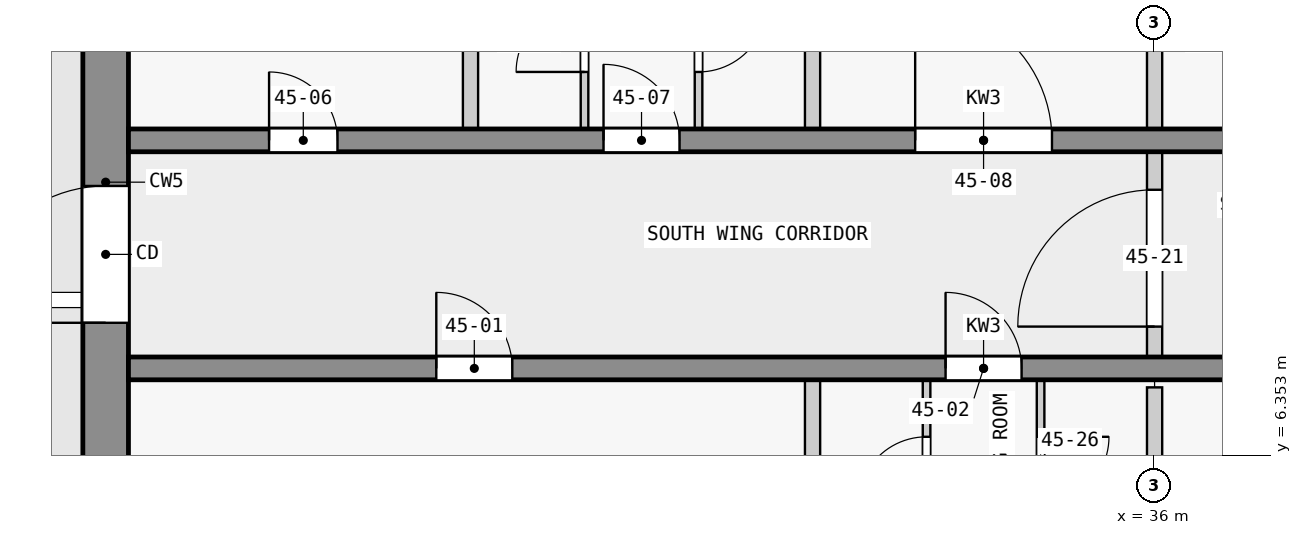
"""IFC4 building model, lengths in metres.
Left out: names, types, materials, properties, quantities, classifications, styles, units other than length and angle.
Written with IfcOpenShell. Run it as: python <this file> out.ifc"""

import sys

from ifc_helpers import new_model, si_unit, direction, frame, frame_2d, origin, place, context, subcontext, project, spatial, rectangle, extrude, element, fill, save


model = new_model("IFC4")
c1 = context("Model", 3, precision=1e-05, world=origin(), true_north=direction((0.0, 1.0)))
c2 = subcontext(c1, "Body", "Model", "MODEL_VIEW")
j1 = project(units=[si_unit("LENGTHUNIT", "METRE"), si_unit("PLANEANGLEUNIT", "RADIAN")], contexts=[c1])
p1 = place(None, origin())
s1 = spatial("IfcSite", under=j1, at=p1, CompositionType="ELEMENT")
p2 = place(p1, origin())
s2 = spatial("IfcBuilding", under=s1, at=p2, CompositionType="ELEMENT")
p3 = place(p2, frame((0.0, 0.0, 174.4)))
s3 = spatial("IfcBuildingStorey", under=s2, at=p3, CompositionType="ELEMENT", Elevation=174.4)
p4 = place(p3, frame((22.2, 2.5, 0.0), z_axis=(0.0, 0.0, 1.0), x_axis=(0.0, 1.0, 0.0)))
e1 = element("IfcWall", 1, at=p4, inside=s3, PredefinedType="SHEAR", context=c2, shape_type="SweptSolid", body=[
    extrude(rectangle(XDim=14.9, YDim=0.6, at=frame_2d((7.45, 0.0))), origin(), (0.0, 0.0, 1.0), 3.25),
])
p5 = place(p4, frame((5.6, 0.0, 0.0)))
e2 = element("IfcOpeningElement", 2, at=p5, cuts=e1, PredefinedType="OPENING", context=c2, shape_type="SweptSolid", body=[
    extrude(rectangle(XDim=1.8, YDim=2.1, at=frame_2d((0.9, 1.05))), frame((0.0, 0.31, 0.0), z_axis=(0.0, -1.0, 0.0), x_axis=(1.0, 0.0, 0.0)), (0.0, 0.0, 1.0), 0.62),
])
p6 = place(p3, frame((22.5, 7.5, 0.0), z_axis=(0.0, 0.0, 1.0), x_axis=(1.0, 0.0, 0.0)))
e3 = element("IfcWall", 3, at=p6, inside=s3, PredefinedType="SHEAR", context=c2, shape_type="SweptSolid", body=[
    extrude(rectangle(XDim=22.5, YDim=0.3, at=frame_2d((11.25, 0.0))), origin(), (0.0, 0.0, 1.0), 3.25),
])
p7 = place(p6, frame((4.05, 0.0, 0.0)))
e4 = element("IfcOpeningElement", 4, at=p7, cuts=e3, PredefinedType="OPENING", context=c2, shape_type="SweptSolid", body=[
    extrude(rectangle(XDim=1.0, YDim=2.1, at=frame_2d((0.5, 1.05))), frame((0.0, 0.16, 0.0), z_axis=(0.0, -1.0, 0.0), x_axis=(1.0, 0.0, 0.0)), (0.0, 0.0, 1.0), 0.32),
])
p8 = place(p6, frame((10.75, 0.0, 0.0)))
e5 = element("IfcOpeningElement", 5, at=p8, cuts=e3, PredefinedType="OPENING", context=c2, shape_type="SweptSolid", body=[
    extrude(rectangle(XDim=1.0, YDim=2.1, at=frame_2d((0.5, 1.05))), frame((0.0, 0.16, 0.0), z_axis=(0.0, -1.0, 0.0), x_axis=(1.0, 0.0, 0.0)), (0.0, 0.0, 1.0), 0.32),
])
p9 = place(p6, frame((15.35, 0.0, 0.0)))
e6 = element("IfcOpeningElement", 6, at=p9, cuts=e3, PredefinedType="OPENING", context=c2, shape_type="SweptSolid", body=[
    extrude(rectangle(XDim=0.9, YDim=2.1, at=frame_2d((0.45, 1.05))), frame((0.0, 0.16, 0.0), z_axis=(0.0, -1.0, 0.0), x_axis=(1.0, 0.0, 0.0)), (0.0, 0.0, 1.0), 0.32),
])
p10 = place(p6, frame((18.75, 0.0, 0.0)))
e7 = element("IfcOpeningElement", 7, at=p10, cuts=e3, PredefinedType="OPENING", context=c2, shape_type="SweptSolid", body=[
    extrude(rectangle(XDim=0.9, YDim=2.1, at=frame_2d((0.45, 1.05))), frame((0.0, 0.16, 0.0), z_axis=(0.0, -1.0, 0.0), x_axis=(1.0, 0.0, 0.0)), (0.0, 0.0, 1.0), 0.32),
])
p11 = place(p6, frame((20.95, 0.0, 0.0)))
e8 = element("IfcOpeningElement", 8, at=p11, cuts=e3, PredefinedType="OPENING", context=c2, shape_type="SweptSolid", body=[
    extrude(rectangle(XDim=1.0, YDim=2.1, at=frame_2d((0.5, 1.05))), frame((0.0, 0.16, 0.0), z_axis=(0.0, -1.0, 0.0), x_axis=(1.0, 0.0, 0.0)), (0.0, 0.0, 1.0), 0.32),
])
p12 = place(p3, frame((22.5, 10.5, 0.0), z_axis=(0.0, 0.0, 1.0), x_axis=(1.0, 0.0, 0.0)))
e9 = element("IfcWall", 9, at=p12, inside=s3, PredefinedType="SHEAR", context=c2, shape_type="SweptSolid", body=[
    extrude(rectangle(XDim=22.5, YDim=0.3, at=frame_2d((11.25, 0.0))), origin(), (0.0, 0.0, 1.0), 3.25),
])
p13 = place(p12, frame((1.85, 0.0, 0.0)))
e10 = element("IfcOpeningElement", 10, at=p13, cuts=e9, PredefinedType="OPENING", context=c2, shape_type="SweptSolid", body=[
    extrude(rectangle(XDim=0.9, YDim=2.1, at=frame_2d((0.45, 1.05))), frame((0.0, 0.16, 0.0), z_axis=(0.0, -1.0, 0.0), x_axis=(1.0, 0.0, 0.0)), (0.0, 0.0, 1.0), 0.32),
])
p14 = place(p12, frame((6.25, 0.0, 0.0)))
e11 = element("IfcOpeningElement", 11, at=p14, cuts=e9, PredefinedType="OPENING", context=c2, shape_type="SweptSolid", body=[
    extrude(rectangle(XDim=1.0, YDim=2.1, at=frame_2d((0.5, 1.05))), frame((0.0, 0.16, 0.0), z_axis=(0.0, -1.0, 0.0), x_axis=(1.0, 0.0, 0.0)), (0.0, 0.0, 1.0), 0.32),
])
p15 = place(p12, frame((10.35, 0.0, 0.0)))
e12 = element("IfcOpeningElement", 12, at=p15, cuts=e9, PredefinedType="OPENING", context=c2, shape_type="SweptSolid", body=[
    extrude(rectangle(XDim=1.8, YDim=2.1, at=frame_2d((0.9, 1.05))), frame((0.0, 0.16, 0.0), z_axis=(0.0, -1.0, 0.0), x_axis=(1.0, 0.0, 0.0)), (0.0, 0.0, 1.0), 0.32),
])
p16 = place(p12, frame((16.85, 0.0, 0.0)))
e13 = element("IfcOpeningElement", 13, at=p16, cuts=e9, PredefinedType="OPENING", context=c2, shape_type="SweptSolid", body=[
    extrude(rectangle(XDim=1.0, YDim=2.1, at=frame_2d((0.5, 1.05))), frame((0.0, 0.16, 0.0), z_axis=(0.0, -1.0, 0.0), x_axis=(1.0, 0.0, 0.0)), (0.0, 0.0, 1.0), 0.32),
])
p17 = place(p3, frame((27.0, 10.65, 0.0), z_axis=(0.0, 0.0, 1.0), x_axis=(0.0, 1.0, 0.0)))
e14 = element("IfcWall", 14, at=p17, inside=s3, PredefinedType="PARTITIONING", context=c2, shape_type="SweptSolid", body=[
    extrude(rectangle(XDim=5.823, YDim=0.2, at=frame_2d((2.912, 0.0))), origin(), (0.0, 0.0, 1.0), 3.25),
])
p18 = place(p3, frame((28.5, 10.65, 0.0), z_axis=(0.0, 0.0, 1.0), x_axis=(0.0, 1.0, 0.0)))
e15 = element("IfcWall", 15, at=p18, inside=s3, PredefinedType="PARTITIONING", context=c2, shape_type="SweptSolid", body=[
    extrude(rectangle(XDim=2.4, YDim=0.1, at=frame_2d((1.2, 0.0))), origin(), (0.0, 0.0, 1.0), 3.25),
])
p19 = place(p18, frame((0.75, 0.0, 0.0)))
e16 = element("IfcOpeningElement", 16, at=p19, cuts=e15, PredefinedType="OPENING", context=c2, shape_type="SweptSolid", body=[
    extrude(rectangle(XDim=0.9, YDim=2.1, at=frame_2d((0.45, 1.05))), frame((0.0, 0.06, 0.0), z_axis=(0.0, -1.0, 0.0), x_axis=(1.0, 0.0, 0.0)), (0.0, 0.0, 1.0), 0.12),
])
p20 = place(p3, frame((30.0, 13.05, 0.0), z_axis=(0.0, 0.0, 1.0), x_axis=(0.0, -1.0, 0.0)))
e17 = element("IfcWall", 17, at=p20, inside=s3, PredefinedType="PARTITIONING", context=c2, shape_type="SweptSolid", body=[
    extrude(rectangle(XDim=2.4, YDim=0.1, at=frame_2d((1.2, 0.0))), origin(), (0.0, 0.0, 1.0), 3.25),
])
p21 = place(p20, frame((0.75, 0.0, 0.0)))
e18 = element("IfcOpeningElement", 18, at=p21, cuts=e17, PredefinedType="OPENING", context=c2, shape_type="SweptSolid", body=[
    extrude(rectangle(XDim=0.9, YDim=2.1, at=frame_2d((0.45, 1.05))), frame((0.0, 0.06, 0.0), z_axis=(0.0, -1.0, 0.0), x_axis=(1.0, 0.0, 0.0)), (0.0, 0.0, 1.0), 0.12),
])
p22 = place(p3, frame((31.5, 1.122, 0.0), z_axis=(0.0, 0.0, 1.0), x_axis=(0.0, 1.0, 0.0)))
e19 = element("IfcWall", 19, at=p22, inside=s3, PredefinedType="PARTITIONING", context=c2, shape_type="SweptSolid", body=[
    extrude(rectangle(XDim=6.228, YDim=0.2, at=frame_2d((3.114, 0.0))), origin(), (0.0, 0.0, 1.0), 3.25),
])
p23 = place(p3, frame((31.5, 10.65, 0.0), z_axis=(0.0, 0.0, 1.0), x_axis=(0.0, 1.0, 0.0)))
e20 = element("IfcWall", 20, at=p23, inside=s3, PredefinedType="PARTITIONING", context=c2, shape_type="SweptSolid", body=[
    extrude(rectangle(XDim=2.3, YDim=0.2, at=frame_2d((1.15, 0.0))), origin(), (0.0, 0.0, 1.0), 3.25),
])
p24 = place(p3, frame((33.0, 4.95, 0.0), z_axis=(0.0, 0.0, 1.0), x_axis=(0.0, 1.0, 0.0)))
e21 = element("IfcWall", 21, at=p24, inside=s3, PredefinedType="PARTITIONING", context=c2, shape_type="SweptSolid", body=[
    extrude(rectangle(XDim=2.4, YDim=0.1, at=frame_2d((1.2, 0.0))), origin(), (0.0, 0.0, 1.0), 3.25),
])
p25 = place(p24, frame((0.75, 0.0, 0.0)))
e22 = element("IfcOpeningElement", 22, at=p25, cuts=e21, PredefinedType="OPENING", context=c2, shape_type="SweptSolid", body=[
    extrude(rectangle(XDim=0.9, YDim=2.1, at=frame_2d((0.45, 1.05))), frame((0.0, 0.06, 0.0), z_axis=(0.0, -1.0, 0.0), x_axis=(1.0, 0.0, 0.0)), (0.0, 0.0, 1.0), 0.12),
])
p26 = place(p3, frame((34.5, 7.35, 0.0), z_axis=(0.0, 0.0, 1.0), x_axis=(0.0, -1.0, 0.0)))
e23 = element("IfcWall", 23, at=p26, inside=s3, PredefinedType="PARTITIONING", context=c2, shape_type="SweptSolid", body=[
    extrude(rectangle(XDim=2.4, YDim=0.1, at=frame_2d((1.2, 0.0))), origin(), (0.0, 0.0, 1.0), 3.25),
])
p27 = place(p26, frame((0.75, 0.0, 0.0)))
e24 = element("IfcOpeningElement", 24, at=p27, cuts=e23, PredefinedType="OPENING", context=c2, shape_type="SweptSolid", body=[
    extrude(rectangle(XDim=0.9, YDim=2.1, at=frame_2d((0.45, 1.05))), frame((0.0, 0.06, 0.0), z_axis=(0.0, -1.0, 0.0), x_axis=(1.0, 0.0, 0.0)), (0.0, 0.0, 1.0), 0.12),
])
p28 = place(p3, frame((36.0, 5.05, 0.0), z_axis=(0.0, 0.0, 1.0), x_axis=(0.0, 1.0, 0.0)))
e25 = element("IfcWall", 25, at=p28, inside=s3, PredefinedType="PARTITIONING", context=c2, shape_type="SweptSolid", body=[
    extrude(rectangle(XDim=2.2, YDim=0.2, at=frame_2d((1.1, 0.0))), origin(), (0.0, 0.0, 1.0), 3.25),
])
p29 = place(p3, frame((36.0, 10.65, 0.0), z_axis=(0.0, 0.0, 1.0), x_axis=(0.0, 1.0, 0.0)))
e26 = element("IfcWall", 26, at=p29, inside=s3, PredefinedType="PARTITIONING", context=c2, shape_type="SweptSolid", body=[
    extrude(rectangle(XDim=5.95, YDim=0.2, at=frame_2d((2.975, 0.0))), origin(), (0.0, 0.0, 1.0), 3.25),
])
p30 = place(p3, frame((36.0, 7.35, 0.0), z_axis=(0.0, 0.0, 1.0), x_axis=(0.0, 1.0, 0.0)))
e27 = element("IfcWall", 27, at=p30, inside=s3, PredefinedType="PARTITIONING", context=c2, shape_type="SweptSolid", body=[
    extrude(rectangle(XDim=3.2, YDim=0.2, at=frame_2d((1.6, 0.0))), origin(), (0.0, 0.0, 1.0), 3.25),
])
p31 = place(p30, frame((0.7, 0.0, 0.0)))
e28 = element("IfcOpeningElement", 28, at=p31, cuts=e27, PredefinedType="OPENING", context=c2, shape_type="SweptSolid", body=[
    extrude(rectangle(XDim=1.8, YDim=2.1, at=frame_2d((0.9, 1.05))), frame((0.0, 0.11, 0.0), z_axis=(0.0, -1.0, 0.0), x_axis=(1.0, 0.0, 0.0)), (0.0, 0.0, 1.0), 0.22),
])
p32 = place(p5, origin())
e29 = element("IfcDoor", 29, at=p32, inside=s3, OperationType="DOUBLE_DOOR_SINGLE_SWING", PredefinedType="DOOR", context=c2, shape_type="SweptSolid", body=[
    extrude(rectangle(XDim=1.8, YDim=2.1, at=frame_2d((0.9, 1.05))), frame((0.0, 0.025, 0.0), z_axis=(0.0, -1.0, 0.0), x_axis=(1.0, 0.0, 0.0)), (0.0, 0.0, 1.0), 0.05),
])
fill(e2, e29)
p33 = place(p7, origin())
e30 = element("IfcDoor", 30, at=p33, inside=s3, OperationType="SINGLE_SWING_LEFT", PredefinedType="DOOR", context=c2, shape_type="SweptSolid", body=[
    extrude(rectangle(XDim=1.0, YDim=2.1, at=frame_2d((0.5, 1.05))), frame((0.0, 0.025, 0.0), z_axis=(0.0, -1.0, 0.0), x_axis=(1.0, 0.0, 0.0)), (0.0, 0.0, 1.0), 0.05),
])
fill(e4, e30)
p34 = place(p8, origin())
e31 = element("IfcDoor", 31, at=p34, inside=s3, OperationType="SINGLE_SWING_LEFT", PredefinedType="DOOR", context=c2, shape_type="SweptSolid", body=[
    extrude(rectangle(XDim=1.0, YDim=2.1, at=frame_2d((0.5, 1.05))), frame((0.0, 0.025, 0.0), z_axis=(0.0, -1.0, 0.0), x_axis=(1.0, 0.0, 0.0)), (0.0, 0.0, 1.0), 0.05),
])
fill(e5, e31)
p35 = place(p13, origin())
e32 = element("IfcDoor", 32, at=p35, inside=s3, OperationType="SINGLE_SWING_LEFT", PredefinedType="DOOR", context=c2, shape_type="SweptSolid", body=[
    extrude(rectangle(XDim=0.9, YDim=2.1, at=frame_2d((0.45, 1.05))), frame((0.0, 0.025, 0.0), z_axis=(0.0, -1.0, 0.0), x_axis=(1.0, 0.0, 0.0)), (0.0, 0.0, 1.0), 0.05),
])
fill(e10, e32)
p36 = place(p14, origin())
e33 = element("IfcDoor", 33, at=p36, inside=s3, OperationType="SINGLE_SWING_LEFT", PredefinedType="DOOR", context=c2, shape_type="SweptSolid", body=[
    extrude(rectangle(XDim=1.0, YDim=2.1, at=frame_2d((0.5, 1.05))), frame((0.0, 0.025, 0.0), z_axis=(0.0, -1.0, 0.0), x_axis=(1.0, 0.0, 0.0)), (0.0, 0.0, 1.0), 0.05),
])
fill(e11, e33)
p37 = place(p15, origin())
e34 = element("IfcDoor", 34, at=p37, inside=s3, OperationType="SINGLE_SWING_LEFT", PredefinedType="DOOR", context=c2, shape_type="SweptSolid", body=[
    extrude(rectangle(XDim=1.8, YDim=2.1, at=frame_2d((0.9, 1.05))), frame((0.0, 0.025, 0.0), z_axis=(0.0, -1.0, 0.0), x_axis=(1.0, 0.0, 0.0)), (0.0, 0.0, 1.0), 0.05),
])
fill(e12, e34)
p38 = place(p31, origin())
e35 = element("IfcDoor", 35, at=p38, inside=s3, OperationType="SINGLE_SWING_LEFT", PredefinedType="DOOR", context=c2, shape_type="SweptSolid", body=[
    extrude(rectangle(XDim=1.8, YDim=2.1, at=frame_2d((0.9, 1.05))), frame((0.0, 0.025, 0.0), z_axis=(0.0, -1.0, 0.0), x_axis=(1.0, 0.0, 0.0)), (0.0, 0.0, 1.0), 0.05),
])
fill(e28, e35)
p39 = place(p25, origin())
e36 = element("IfcDoor", 36, at=p39, inside=s3, OperationType="SINGLE_SWING_RIGHT", PredefinedType="DOOR", context=c2, shape_type="SweptSolid", body=[
    extrude(rectangle(XDim=0.9, YDim=2.1, at=frame_2d((0.45, 1.05))), frame((0.0, 0.025, 0.0), z_axis=(0.0, -1.0, 0.0), x_axis=(1.0, 0.0, 0.0)), (0.0, 0.0, 1.0), 0.05),
])
fill(e22, e36)
p40 = place(p27, origin())
e37 = element("IfcDoor", 37, at=p40, inside=s3, OperationType="SINGLE_SWING_RIGHT", PredefinedType="DOOR", context=c2, shape_type="SweptSolid", body=[
    extrude(rectangle(XDim=0.9, YDim=2.1, at=frame_2d((0.45, 1.05))), frame((0.0, 0.025, 0.0), z_axis=(0.0, -1.0, 0.0), x_axis=(1.0, 0.0, 0.0)), (0.0, 0.0, 1.0), 0.05),
])
fill(e24, e37)
p41 = place(p19, origin())
e38 = element("IfcDoor", 38, at=p41, inside=s3, OperationType="SINGLE_SWING_LEFT", PredefinedType="DOOR", context=c2, shape_type="SweptSolid", body=[
    extrude(rectangle(XDim=0.9, YDim=2.1, at=frame_2d((0.45, 1.05))), frame((0.0, 0.025, 0.0), z_axis=(0.0, -1.0, 0.0), x_axis=(1.0, 0.0, 0.0)), (0.0, 0.0, 1.0), 0.05),
])
fill(e16, e38)
p42 = place(p21, origin())
e39 = element("IfcDoor", 39, at=p42, inside=s3, OperationType="SINGLE_SWING_LEFT", PredefinedType="DOOR", context=c2, shape_type="SweptSolid", body=[
    extrude(rectangle(XDim=0.9, YDim=2.1, at=frame_2d((0.45, 1.05))), frame((0.0, 0.025, 0.0), z_axis=(0.0, -1.0, 0.0), x_axis=(1.0, 0.0, 0.0)), (0.0, 0.0, 1.0), 0.05),
])
fill(e18, e39)
save(model, sys.argv[1])
